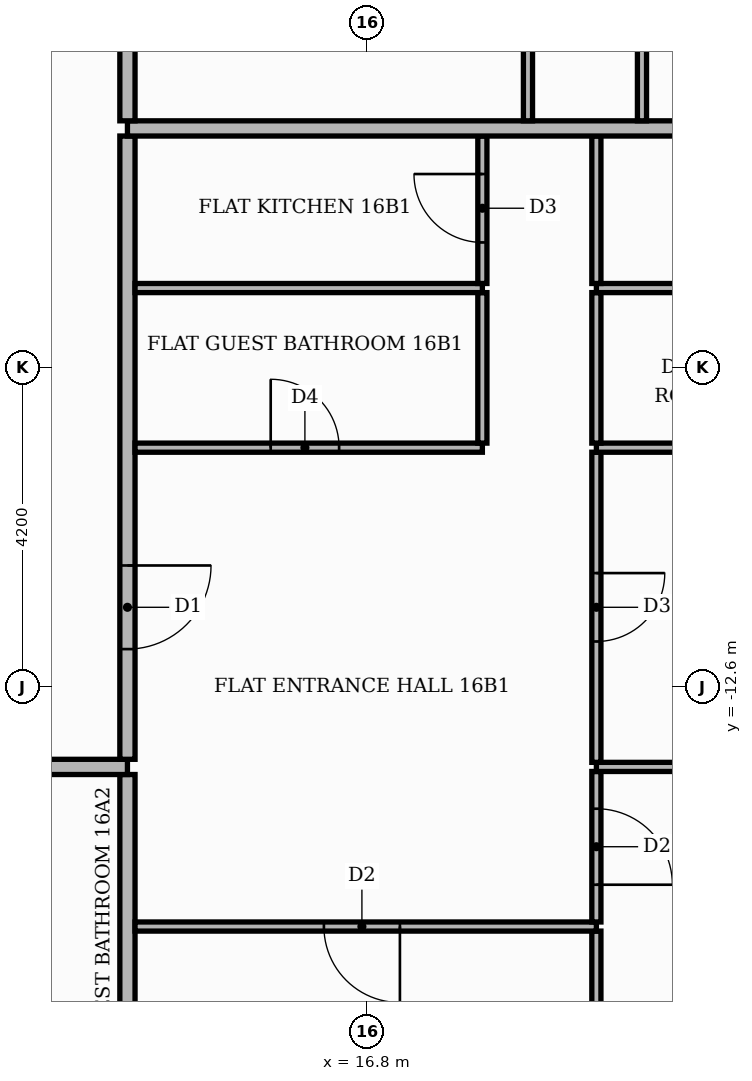
"""IFC4 building model, lengths in metres.
Left out: names, types, materials, properties, quantities, classifications, styles, units other than length and angle.
Written with IfcOpenShell. Run it as: python <this file> out.ifc"""

import sys

from ifc_helpers import new_model, si_unit, direction, frame, frame_2d, origin, place, context, subcontext, project, spatial, rectangle, extrude, element, fill, save


model = new_model("IFC4")
c1 = context("Model", 3, precision=1e-05, world=origin(), true_north=direction((0.0, 1.0)))
c2 = subcontext(c1, "Body", "Model", "MODEL_VIEW")
j1 = project(units=[si_unit("LENGTHUNIT", "METRE"), si_unit("PLANEANGLEUNIT", "RADIAN")], contexts=[c1])
p1 = place(None, origin())
s1 = spatial("IfcSite", under=j1, at=p1, CompositionType="ELEMENT")
p2 = place(p1, origin())
s2 = spatial("IfcBuilding", under=s1, at=p2, CompositionType="ELEMENT")
p3 = place(p2, frame((0.0, 0.0, 69.9)))
s3 = spatial("IfcBuildingStorey", under=s2, at=p3, CompositionType="ELEMENT", Elevation=69.9)
p4 = place(p3, frame((13.65, -20.42, 0.0), z_axis=(0.0, 0.0, 1.0), x_axis=(0.0, 1.0, 0.0)))
e1 = element("IfcWall", 1, at=p4, inside=s3, PredefinedType="PARTITIONING", context=c2, shape_type="SweptSolid", body=[
    extrude(rectangle(XDim=6.67, YDim=0.2, at=frame_2d((3.335, 0.0))), origin(), (0.0, 0.0, 1.0), 3.4),
])
p5 = place(p3, frame((19.82, -17.3, 0.0), z_axis=(0.0, 0.0, 1.0), x_axis=(0.0, 1.0, 0.0)))
e2 = element("IfcWall", 2, at=p5, inside=s3, PredefinedType="PARTITIONING", context=c2, shape_type="SweptSolid", body=[
    extrude(rectangle(XDim=1.49, YDim=0.12, at=frame_2d((0.745, 0.0))), origin(), (0.0, 0.0, 1.0), 3.4),
])
p6 = place(p3, frame((13.75, -15.75, 0.0), z_axis=(0.0, 0.0, 1.0), x_axis=(1.0, 0.0, 0.0)))
e3 = element("IfcWall", 3, at=p6, inside=s3, PredefinedType="PARTITIONING", context=c2, shape_type="SweptSolid", body=[
    extrude(rectangle(XDim=6.07, YDim=0.12, at=frame_2d((3.035, 0.0))), origin(), (0.0, 0.0, 1.0), 3.4),
])
p7 = place(p6, frame((2.485, 0.0, 0.0)))
e4 = element("IfcOpeningElement", 4, at=p7, cuts=e3, PredefinedType="OPENING", context=c2, shape_type="SweptSolid", body=[
    extrude(rectangle(XDim=1.0, YDim=2.1, at=frame_2d((0.5, 1.05))), frame((0.0, 0.07, 0.0), z_axis=(0.0, -1.0, 0.0), x_axis=(1.0, 0.0, 0.0)), (0.0, 0.0, 1.0), 0.14),
])
p8 = place(p3, frame((19.82, -15.69, 0.0), z_axis=(0.0, 0.0, 1.0), x_axis=(0.0, 1.0, 0.0)))
e5 = element("IfcWall", 5, at=p8, inside=s3, PredefinedType="PARTITIONING", context=c2, shape_type="SweptSolid", body=[
    extrude(rectangle(XDim=1.98, YDim=0.12, at=frame_2d((0.99, 0.0))), origin(), (0.0, 0.0, 1.0), 3.4),
])
p9 = place(p8, frame((0.49, 0.0, 0.0)))
e6 = element("IfcOpeningElement", 6, at=p9, cuts=e5, PredefinedType="OPENING", context=c2, shape_type="SweptSolid", body=[
    extrude(rectangle(XDim=1.0, YDim=2.1, at=frame_2d((0.5, 1.05))), frame((0.0, 0.07, 0.0), z_axis=(0.0, -1.0, 0.0), x_axis=(1.0, 0.0, 0.0)), (0.0, 0.0, 1.0), 0.14),
])
p10 = place(p3, frame((-25.42, -13.65, 0.0), z_axis=(0.0, 0.0, 1.0), x_axis=(1.0, 0.0, 0.0)))
e7 = element("IfcWall", 7, at=p10, inside=s3, PredefinedType="PARTITIONING", context=c2, shape_type="SweptSolid", body=[
    extrude(rectangle(XDim=39.07, YDim=0.2, at=frame_2d((19.535, 0.0))), origin(), (0.0, 0.0, 1.0), 3.4),
])
p11 = place(p10, frame((13.32, 0.0, 0.0)))
e8 = element("IfcOpeningElement", 8, at=p11, cuts=e7, PredefinedType="OPENING", context=c2, shape_type="SweptSolid", body=[
    extrude(rectangle(XDim=1.1, YDim=2.4, at=frame_2d((0.55, 1.2))), frame((0.0, 0.11, 0.0), z_axis=(0.0, -1.0, 0.0), x_axis=(1.0, 0.0, 0.0)), (0.0, 0.0, 1.0), 0.22),
])
p12 = place(p10, frame((21.72, 0.0, 0.0)))
e9 = element("IfcOpeningElement", 9, at=p12, cuts=e7, PredefinedType="OPENING", context=c2, shape_type="SweptSolid", body=[
    extrude(rectangle(XDim=1.1, YDim=2.4, at=frame_2d((0.55, 1.2))), frame((0.0, 0.11, 0.0), z_axis=(0.0, -1.0, 0.0), x_axis=(1.0, 0.0, 0.0)), (0.0, 0.0, 1.0), 0.22),
])
p13 = place(p3, frame((19.82, -13.65, 0.0), z_axis=(0.0, 0.0, 1.0), x_axis=(1.0, 0.0, 0.0)))
e10 = element("IfcWall", 10, at=p13, inside=s3, PredefinedType="PARTITIONING", context=c2, shape_type="SweptSolid", body=[
    extrude(rectangle(XDim=5.6, YDim=0.12, at=frame_2d((2.8, 0.0))), origin(), (0.0, 0.0, 1.0), 3.4),
])
p14 = place(p3, frame((19.82, -13.59, 0.0), z_axis=(0.0, 0.0, 1.0), x_axis=(0.0, 1.0, 0.0)))
e11 = element("IfcWall", 11, at=p14, inside=s3, PredefinedType="PARTITIONING", context=c2, shape_type="SweptSolid", body=[
    extrude(rectangle(XDim=4.08, YDim=0.12, at=frame_2d((2.04, 0.0))), origin(), (0.0, 0.0, 1.0), 3.4),
])
p15 = place(p14, frame((1.59, 0.0, 0.0)))
e12 = element("IfcOpeningElement", 12, at=p15, cuts=e11, PredefinedType="OPENING", context=c2, shape_type="SweptSolid", body=[
    extrude(rectangle(XDim=0.9, YDim=2.1, at=frame_2d((0.45, 1.05))), frame((0.0, 0.07, 0.0), z_axis=(0.0, -1.0, 0.0), x_axis=(1.0, 0.0, 0.0)), (0.0, 0.0, 1.0), 0.14),
])
p16 = place(p3, frame((13.65, -13.55, 0.0), z_axis=(0.0, 0.0, 1.0), x_axis=(0.0, 1.0, 0.0)))
e13 = element("IfcWall", 13, at=p16, inside=s3, PredefinedType="PARTITIONING", context=c2, shape_type="SweptSolid", body=[
    extrude(rectangle(XDim=8.2, YDim=0.2, at=frame_2d((4.1, 0.0))), origin(), (0.0, 0.0, 1.0), 3.4),
])
p17 = place(p16, frame((1.45, 0.0, 0.0)))
e14 = element("IfcOpeningElement", 14, at=p17, cuts=e13, PredefinedType="OPENING", context=c2, shape_type="SweptSolid", body=[
    extrude(rectangle(XDim=1.1, YDim=2.4, at=frame_2d((0.55, 1.2))), frame((0.0, 0.11, 0.0), z_axis=(0.0, -1.0, 0.0), x_axis=(1.0, 0.0, 0.0)), (0.0, 0.0, 1.0), 0.22),
])
p18 = place(p3, frame((13.75, -9.45, 0.0), z_axis=(0.0, 0.0, 1.0), x_axis=(1.0, 0.0, 0.0)))
e15 = element("IfcWall", 15, at=p18, inside=s3, PredefinedType="PARTITIONING", context=c2, shape_type="SweptSolid", body=[
    extrude(rectangle(XDim=4.57, YDim=0.12, at=frame_2d((2.285, 0.0))), origin(), (0.0, 0.0, 1.0), 3.4),
])
p19 = place(p18, frame((1.785, 0.0, 0.0)))
e16 = element("IfcOpeningElement", 16, at=p19, cuts=e15, PredefinedType="OPENING", context=c2, shape_type="SweptSolid", body=[
    extrude(rectangle(XDim=0.9, YDim=2.1, at=frame_2d((0.45, 1.05))), frame((0.0, 0.07, 0.0), z_axis=(0.0, -1.0, 0.0), x_axis=(1.0, 0.0, 0.0)), (0.0, 0.0, 1.0), 0.14),
])
p20 = place(p3, frame((19.82, -9.45, 0.0), z_axis=(0.0, 0.0, 1.0), x_axis=(1.0, 0.0, 0.0)))
e17 = element("IfcWall", 17, at=p20, inside=s3, PredefinedType="PARTITIONING", context=c2, shape_type="SweptSolid", body=[
    extrude(rectangle(XDim=5.6, YDim=0.12, at=frame_2d((2.8, 0.0))), origin(), (0.0, 0.0, 1.0), 3.4),
])
p21 = place(p20, frame((2.5, 0.0, 0.0)))
e18 = element("IfcOpeningElement", 18, at=p21, cuts=e17, PredefinedType="OPENING", context=c2, shape_type="SweptSolid", body=[
    extrude(rectangle(XDim=0.9, YDim=2.1, at=frame_2d((0.45, 1.05))), frame((0.0, 0.07, 0.0), z_axis=(0.0, -1.0, 0.0), x_axis=(1.0, 0.0, 0.0)), (0.0, 0.0, 1.0), 0.14),
])
for number, where, z_axis, x_axis in (
    (19, (18.32, -9.39, 0.0), (0.0, 0.0, 1.0), (0.0, 1.0, 0.0)),
    (20, (19.82, -9.39, 0.0), (0.0, 0.0, 1.0), (0.0, 1.0, 0.0)),
):
    element("IfcWall", number, at=place(p3, frame(where, z_axis=z_axis, x_axis=x_axis)), inside=s3, PredefinedType="PARTITIONING", context=c2, shape_type="SweptSolid", body=[
        extrude(rectangle(XDim=1.98, YDim=0.12, at=frame_2d((0.99, 0.0))), origin(), (0.0, 0.0, 1.0), 3.4),
    ])
p22 = place(p3, frame((13.75, -7.35, 0.0), z_axis=(0.0, 0.0, 1.0), x_axis=(1.0, 0.0, 0.0)))
e21 = element("IfcWall", 21, at=p22, inside=s3, PredefinedType="PARTITIONING", context=c2, shape_type="SweptSolid", body=[
    extrude(rectangle(XDim=4.57, YDim=0.12, at=frame_2d((2.285, 0.0))), origin(), (0.0, 0.0, 1.0), 3.4),
])
p23 = place(p3, frame((19.82, -7.35, 0.0), z_axis=(0.0, 0.0, 1.0), x_axis=(1.0, 0.0, 0.0)))
e22 = element("IfcWall", 22, at=p23, inside=s3, PredefinedType="PARTITIONING", context=c2, shape_type="SweptSolid", body=[
    extrude(rectangle(XDim=5.6, YDim=0.12, at=frame_2d((2.8, 0.0))), origin(), (0.0, 0.0, 1.0), 3.4),
])
p24 = place(p23, frame((2.5, 0.0, 0.0)))
e23 = element("IfcOpeningElement", 23, at=p24, cuts=e22, PredefinedType="OPENING", context=c2, shape_type="SweptSolid", body=[
    extrude(rectangle(XDim=0.9, YDim=2.1, at=frame_2d((0.45, 1.05))), frame((0.0, 0.07, 0.0), z_axis=(0.0, -1.0, 0.0), x_axis=(1.0, 0.0, 0.0)), (0.0, 0.0, 1.0), 0.14),
])
p25 = place(p3, frame((18.32, -7.29, 0.0), z_axis=(0.0, 0.0, 1.0), x_axis=(0.0, 1.0, 0.0)))
e24 = element("IfcWall", 24, at=p25, inside=s3, PredefinedType="PARTITIONING", context=c2, shape_type="SweptSolid", body=[
    extrude(rectangle(XDim=1.94, YDim=0.12, at=frame_2d((0.97, 0.0))), origin(), (0.0, 0.0, 1.0), 3.4),
])
p26 = place(p25, frame((0.54, 0.0, 0.0)))
e25 = element("IfcOpeningElement", 25, at=p26, cuts=e24, PredefinedType="OPENING", context=c2, shape_type="SweptSolid", body=[
    extrude(rectangle(XDim=0.9, YDim=2.1, at=frame_2d((0.45, 1.05))), frame((0.0, 0.07, 0.0), z_axis=(0.0, -1.0, 0.0), x_axis=(1.0, 0.0, 0.0)), (0.0, 0.0, 1.0), 0.14),
])
p27 = place(p3, frame((19.82, -7.29, 0.0), z_axis=(0.0, 0.0, 1.0), x_axis=(0.0, 1.0, 0.0)))
e26 = element("IfcWall", 26, at=p27, inside=s3, PredefinedType="PARTITIONING", context=c2, shape_type="SweptSolid", body=[
    extrude(rectangle(XDim=1.94, YDim=0.12, at=frame_2d((0.97, 0.0))), origin(), (0.0, 0.0, 1.0), 3.4),
])
p28 = place(p3, frame((13.65, -5.25, 0.0), z_axis=(0.0, 0.0, 1.0), x_axis=(1.0, 0.0, 0.0)))
e27 = element("IfcWall", 27, at=p28, inside=s3, PredefinedType="PARTITIONING", context=c2, shape_type="SweptSolid", body=[
    extrude(rectangle(XDim=11.77, YDim=0.2, at=frame_2d((5.885, 0.0))), origin(), (0.0, 0.0, 1.0), 3.4),
])
p29 = place(p3, frame((13.65, -5.15, 0.0), z_axis=(0.0, 0.0, 1.0), x_axis=(0.0, 1.0, 0.0)))
e28 = element("IfcWall", 28, at=p29, inside=s3, PredefinedType="PARTITIONING", context=c2, shape_type="SweptSolid", body=[
    extrude(rectangle(XDim=18.7, YDim=0.2, at=frame_2d((9.35, 0.0))), origin(), (0.0, 0.0, 1.0), 3.4),
])
p30 = place(p29, frame((5.65, 0.0, 0.0)))
e29 = element("IfcOpeningElement", 29, at=p30, cuts=e28, PredefinedType="OPENING", context=c2, shape_type="SweptSolid", body=[
    extrude(rectangle(XDim=1.1, YDim=2.4, at=frame_2d((0.55, 1.2))), frame((0.0, 0.11, 0.0), z_axis=(0.0, -1.0, 0.0), x_axis=(1.0, 0.0, 0.0)), (0.0, 0.0, 1.0), 0.22),
])
p31 = place(p3, frame((18.92, -5.15, 0.0), z_axis=(0.0, 0.0, 1.0), x_axis=(0.0, 1.0, 0.0)))
e30 = element("IfcWall", 30, at=p31, inside=s3, PredefinedType="PARTITIONING", context=c2, shape_type="SweptSolid", body=[
    extrude(rectangle(XDim=4.04, YDim=0.12, at=frame_2d((2.02, 0.0))), origin(), (0.0, 0.0, 1.0), 3.4),
])
p32 = place(p3, frame((20.42, -5.15, 0.0), z_axis=(0.0, 0.0, 1.0), x_axis=(0.0, 1.0, 0.0)))
e31 = element("IfcWall", 31, at=p32, inside=s3, PredefinedType="PARTITIONING", context=c2, shape_type="SweptSolid", body=[
    extrude(rectangle(XDim=4.04, YDim=0.12, at=frame_2d((2.02, 0.0))), origin(), (0.0, 0.0, 1.0), 3.4),
])
p33 = place(p32, frame((1.5, 0.0, 0.0)))
e32 = element("IfcOpeningElement", 32, at=p33, cuts=e31, PredefinedType="OPENING", context=c2, shape_type="SweptSolid", body=[
    extrude(rectangle(XDim=1.0, YDim=2.1, at=frame_2d((0.5, 1.05))), frame((0.0, 0.07, 0.0), z_axis=(0.0, -1.0, 0.0), x_axis=(1.0, 0.0, 0.0)), (0.0, 0.0, 1.0), 0.14),
])
p34 = place(p17, frame((1.1, 0.0, 0.0), z_axis=(0.0, 0.0, 1.0), x_axis=(-1.0, 0.0, 0.0)))
e33 = element("IfcDoor", 33, at=p34, inside=s3, OperationType="SINGLE_SWING_RIGHT", PredefinedType="DOOR", context=c2, shape_type="SweptSolid", body=[
    extrude(rectangle(XDim=1.1, YDim=2.4, at=frame_2d((0.55, 1.2))), frame((0.0, 0.025, 0.0), z_axis=(0.0, -1.0, 0.0), x_axis=(1.0, 0.0, 0.0)), (0.0, 0.0, 1.0), 0.05),
])
fill(e14, e33)
p35 = place(p7, frame((1.0, 0.0, 0.0), z_axis=(0.0, 0.0, 1.0), x_axis=(-1.0, 0.0, 0.0)))
e34 = element("IfcDoor", 34, at=p35, inside=s3, OperationType="SINGLE_SWING_RIGHT", PredefinedType="DOOR", context=c2, shape_type="SweptSolid", body=[
    extrude(rectangle(XDim=1.0, YDim=2.1, at=frame_2d((0.5, 1.05))), frame((0.0, 0.025, 0.0), z_axis=(0.0, -1.0, 0.0), x_axis=(1.0, 0.0, 0.0)), (0.0, 0.0, 1.0), 0.05),
])
fill(e4, e34)
p36 = place(p19, origin())
e35 = element("IfcDoor", 35, at=p36, inside=s3, OperationType="SINGLE_SWING_LEFT", PredefinedType="DOOR", context=c2, shape_type="SweptSolid", body=[
    extrude(rectangle(XDim=0.9, YDim=2.1, at=frame_2d((0.45, 1.05))), frame((0.0, 0.025, 0.0), z_axis=(0.0, -1.0, 0.0), x_axis=(1.0, 0.0, 0.0)), (0.0, 0.0, 1.0), 0.05),
])
fill(e16, e35)
p37 = place(p26, origin())
e36 = element("IfcDoor", 36, at=p37, inside=s3, OperationType="SINGLE_SWING_RIGHT", PredefinedType="DOOR", context=c2, shape_type="SweptSolid", body=[
    extrude(rectangle(XDim=0.9, YDim=2.1, at=frame_2d((0.45, 1.05))), frame((0.0, 0.025, 0.0), z_axis=(0.0, -1.0, 0.0), x_axis=(1.0, 0.0, 0.0)), (0.0, 0.0, 1.0), 0.05),
])
fill(e25, e36)
p38 = place(p9, frame((1.0, 0.0, 0.0), z_axis=(0.0, 0.0, 1.0), x_axis=(-1.0, 0.0, 0.0)))
e37 = element("IfcDoor", 37, at=p38, inside=s3, OperationType="SINGLE_SWING_LEFT", PredefinedType="DOOR", context=c2, shape_type="SweptSolid", body=[
    extrude(rectangle(XDim=1.0, YDim=2.1, at=frame_2d((0.5, 1.05))), frame((0.0, 0.025, 0.0), z_axis=(0.0, -1.0, 0.0), x_axis=(1.0, 0.0, 0.0)), (0.0, 0.0, 1.0), 0.05),
])
fill(e6, e37)
p39 = place(p15, frame((0.9, 0.0, 0.0), z_axis=(0.0, 0.0, 1.0), x_axis=(-1.0, 0.0, 0.0)))
e38 = element("IfcDoor", 38, at=p39, inside=s3, OperationType="SINGLE_SWING_RIGHT", PredefinedType="DOOR", context=c2, shape_type="SweptSolid", body=[
    extrude(rectangle(XDim=0.9, YDim=2.1, at=frame_2d((0.45, 1.05))), frame((0.0, 0.025, 0.0), z_axis=(0.0, -1.0, 0.0), x_axis=(1.0, 0.0, 0.0)), (0.0, 0.0, 1.0), 0.05),
])
fill(e12, e38)
save(model, sys.argv[1])
